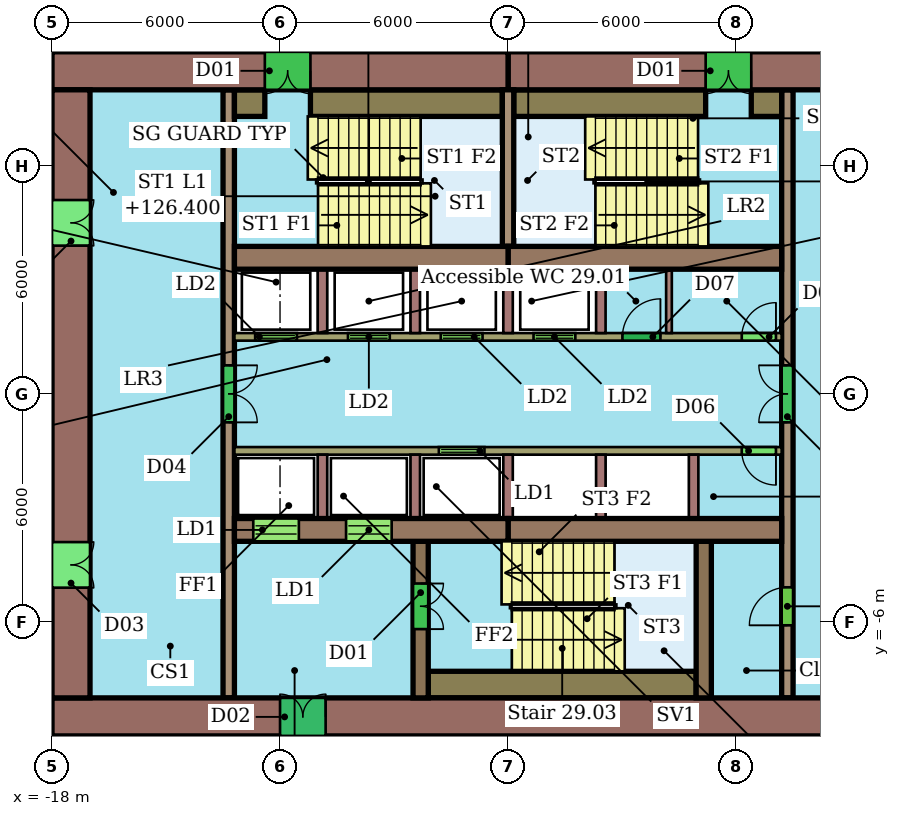
"""IFC4 building model, lengths in metres.
Left out: names, types, materials, properties, quantities, classifications, styles, units other than length and angle.
Written with IfcOpenShell. Run it as: python <this file> out.ifc"""

import sys

from ifc_helpers import new_model, si_unit, direction, frame, frame_2d, origin, place, context, subcontext, project, spatial, rectangle, extrude, element, fill, save


model = new_model("IFC4")
c1 = context("Model", 3, precision=1e-05, world=origin(), true_north=direction((0.0, 1.0)))
c2 = subcontext(c1, "Body", "Model", "MODEL_VIEW")
j1 = project(units=[si_unit("LENGTHUNIT", "METRE"), si_unit("PLANEANGLEUNIT", "RADIAN")], contexts=[c1])
p1 = place(None, origin())
s1 = spatial("IfcSite", under=j1, at=p1, CompositionType="ELEMENT")
p2 = place(p1, origin())
s2 = spatial("IfcBuilding", under=s1, at=p2, CompositionType="ELEMENT")
p3 = place(p2, frame((0.0, 0.0, 124.6)))
s3 = spatial("IfcBuildingStorey", under=s2, at=p3, CompositionType="ELEMENT", Elevation=124.6)
p4 = place(p3, frame((6.0, 8.5, 0.0), z_axis=(0.0, 0.0, 1.0), x_axis=(-1.0, 0.0, 0.0)))
e1 = element("IfcWall", 1, at=p4, inside=s3, PredefinedType="SHEAR", context=c2, shape_type="SweptSolid", body=[
    extrude(rectangle(XDim=12.0, YDim=1.0, at=frame_2d((6.0, 0.0))), origin(), (0.0, 0.0, 1.0), 3.3),
])
p5 = place(p4, frame((5.6, 0.0, 0.0)))
e2 = element("IfcOpeningElement", 2, at=p5, cuts=e1, PredefinedType="OPENING", context=c2, shape_type="SweptSolid", body=[
    extrude(rectangle(XDim=1.2, YDim=2.1, at=frame_2d((0.6, 1.05))), frame((0.0, 0.51, 0.0), z_axis=(0.0, -1.0, 0.0), x_axis=(1.0, 0.0, 0.0)), (0.0, 0.0, 1.0), 1.02),
])
p6 = place(p3, frame((-6.0, 8.5, 0.0), z_axis=(0.0, 0.0, 1.0), x_axis=(-1.0, 0.0, 0.0)))
e3 = element("IfcWall", 3, at=p6, inside=s3, PredefinedType="SHEAR", context=c2, shape_type="SweptSolid", body=[
    extrude(rectangle(XDim=12.0, YDim=1.0, at=frame_2d((6.0, 0.0))), origin(), (0.0, 0.0, 1.0), 3.3),
])
p7 = place(p6, frame((5.2, 0.0, 0.0)))
e4 = element("IfcOpeningElement", 4, at=p7, cuts=e3, PredefinedType="OPENING", context=c2, shape_type="SweptSolid", body=[
    extrude(rectangle(XDim=1.2, YDim=2.1, at=frame_2d((0.6, 1.05))), frame((0.0, 0.51, 0.0), z_axis=(0.0, -1.0, 0.0), x_axis=(1.0, 0.0, 0.0)), (0.0, 0.0, 1.0), 1.02),
])
p8 = place(p3, frame((-18.0, -8.5, 0.0), z_axis=(0.0, 0.0, 1.0), x_axis=(1.0, 0.0, 0.0)))
e5 = element("IfcWall", 5, at=p8, inside=s3, PredefinedType="SHEAR", context=c2, shape_type="SweptSolid", body=[
    extrude(rectangle(XDim=24.0, YDim=1.0, at=frame_2d((12.0, 0.0))), origin(), (0.0, 0.0, 1.0), 3.3),
])
p9 = place(p8, frame((6.0, 0.0, 0.0)))
e6 = element("IfcOpeningElement", 6, at=p9, cuts=e5, PredefinedType="OPENING", context=c2, shape_type="SweptSolid", body=[
    extrude(rectangle(XDim=1.2, YDim=2.1, at=frame_2d((0.6, 1.05))), frame((0.0, 0.51, 0.0), z_axis=(0.0, -1.0, 0.0), x_axis=(1.0, 0.0, 0.0)), (0.0, 0.0, 1.0), 1.02),
])
p10 = place(p3, frame((-17.5, 8.0, 0.0), z_axis=(0.0, 0.0, 1.0), x_axis=(0.0, -1.0, 0.0)))
e7 = element("IfcWall", 7, at=p10, inside=s3, PredefinedType="SHEAR", context=c2, shape_type="SweptSolid", body=[
    extrude(rectangle(XDim=16.0, YDim=1.0, at=frame_2d((8.0, 0.0))), origin(), (0.0, 0.0, 1.0), 3.3),
])
p11 = place(p10, frame((11.9, 0.0, 0.0)))
e8 = element("IfcOpeningElement", 8, at=p11, cuts=e7, PredefinedType="OPENING", context=c2, shape_type="SweptSolid", body=[
    extrude(rectangle(XDim=1.2, YDim=2.1, at=frame_2d((0.6, 1.05))), frame((0.0, 0.51, 0.0), z_axis=(0.0, -1.0, 0.0), x_axis=(1.0, 0.0, 0.0)), (0.0, 0.0, 1.0), 1.02),
])
p12 = place(p10, frame((2.9, 0.0, 0.0)))
e9 = element("IfcOpeningElement", 9, at=p12, cuts=e7, PredefinedType="OPENING", context=c2, shape_type="SweptSolid", body=[
    extrude(rectangle(XDim=1.2, YDim=2.1, at=frame_2d((0.6, 1.05))), frame((0.0, 0.51, 0.0), z_axis=(0.0, -1.0, 0.0), x_axis=(1.0, 0.0, 0.0)), (0.0, 0.0, 1.0), 1.02),
])
for number, where, z_axis, x_axis in (
    (10, (-13.2, 3.58, 0.0), (0.0, 0.0, 1.0), (1.0, 0.0, 0.0)),
    (11, (-6.0, 3.58, 0.0), (0.0, 0.0, 1.0), (1.0, 0.0, 0.0)),
):
    element("IfcWall", number, at=place(p3, frame(where, z_axis=z_axis, x_axis=x_axis)), inside=s3, PredefinedType="SHEAR", context=c2, shape_type="SweptSolid", body=[
        extrude(rectangle(XDim=7.2, YDim=0.6, at=frame_2d((3.6, 0.0))), origin(), (0.0, 0.0, 1.0), 3.3),
    ])
p13 = place(p3, frame((-13.2, -3.58, 0.0), z_axis=(0.0, 0.0, 1.0), x_axis=(1.0, 0.0, 0.0)))
e12 = element("IfcWall", 12, at=p13, inside=s3, PredefinedType="SHEAR", context=c2, shape_type="SweptSolid", body=[
    extrude(rectangle(XDim=7.2, YDim=0.6, at=frame_2d((3.6, 0.0))), origin(), (0.0, 0.0, 1.0), 3.3),
])
p14 = place(p13, frame((0.496, 0.0, 0.0)))
e13 = element("IfcOpeningElement", 13, at=p14, cuts=e12, PredefinedType="OPENING", context=c2, shape_type="SweptSolid", body=[
    extrude(rectangle(XDim=1.2, YDim=2.1, at=frame_2d((0.6, 1.05))), frame((0.0, 0.31, 0.0), z_axis=(0.0, -1.0, 0.0), x_axis=(1.0, 0.0, 0.0)), (0.0, 0.0, 1.0), 0.62),
])
p15 = place(p13, frame((2.938, 0.0, 0.0)))
e14 = element("IfcOpeningElement", 14, at=p15, cuts=e12, PredefinedType="OPENING", context=c2, shape_type="SweptSolid", body=[
    extrude(rectangle(XDim=1.2, YDim=2.1, at=frame_2d((0.6, 1.05))), frame((0.0, 0.31, 0.0), z_axis=(0.0, -1.0, 0.0), x_axis=(1.0, 0.0, 0.0)), (0.0, 0.0, 1.0), 0.62),
])
p16 = place(p3, frame((-6.0, -3.58, 0.0), z_axis=(0.0, 0.0, 1.0), x_axis=(1.0, 0.0, 0.0)))
e15 = element("IfcWall", 15, at=p16, inside=s3, PredefinedType="SHEAR", context=c2, shape_type="SweptSolid", body=[
    extrude(rectangle(XDim=7.2, YDim=0.6, at=frame_2d((3.6, 0.0))), origin(), (0.0, 0.0, 1.0), 3.3),
])
p17 = place(p3, frame((-13.35, 8.0, 0.0), z_axis=(0.0, 0.0, 1.0), x_axis=(0.0, -1.0, 0.0)))
e16 = element("IfcWall", 16, at=p17, inside=s3, PredefinedType="SHEAR", context=c2, shape_type="SweptSolid", body=[
    extrude(rectangle(XDim=16.0, YDim=0.3, at=frame_2d((8.0, 0.0))), origin(), (0.0, 0.0, 1.0), 3.3),
])
p18 = place(p17, frame((7.25, 0.0, 0.0)))
e17 = element("IfcOpeningElement", 17, at=p18, cuts=e16, PredefinedType="OPENING", context=c2, shape_type="SweptSolid", body=[
    extrude(rectangle(XDim=1.5, YDim=2.1, at=frame_2d((0.75, 1.05))), frame((0.0, 0.16, 0.0), z_axis=(0.0, -1.0, 0.0), x_axis=(1.0, 0.0, 0.0)), (0.0, 0.0, 1.0), 0.32),
])
p19 = place(p3, frame((1.35, -8.0, 0.0), z_axis=(0.0, 0.0, 1.0), x_axis=(0.0, 1.0, 0.0)))
e18 = element("IfcWall", 18, at=p19, inside=s3, PredefinedType="SHEAR", context=c2, shape_type="SweptSolid", body=[
    extrude(rectangle(XDim=16.0, YDim=0.3, at=frame_2d((8.0, 0.0))), origin(), (0.0, 0.0, 1.0), 3.3),
])
p20 = place(p19, frame((1.91, 0.0, 0.0)))
e19 = element("IfcOpeningElement", 19, at=p20, cuts=e18, PredefinedType="OPENING", context=c2, shape_type="SweptSolid", body=[
    extrude(rectangle(XDim=1.0, YDim=2.1, at=frame_2d((0.5, 1.05))), frame((0.0, 0.16, 0.0), z_axis=(0.0, -1.0, 0.0), x_axis=(1.0, 0.0, 0.0)), (0.0, 0.0, 1.0), 0.32),
])
p21 = place(p19, frame((7.25, 0.0, 0.0)))
e20 = element("IfcOpeningElement", 20, at=p21, cuts=e18, PredefinedType="OPENING", context=c2, shape_type="SweptSolid", body=[
    extrude(rectangle(XDim=1.5, YDim=2.1, at=frame_2d((0.75, 1.05))), frame((0.0, 0.16, 0.0), z_axis=(0.0, -1.0, 0.0), x_axis=(1.0, 0.0, 0.0)), (0.0, 0.0, 1.0), 0.32),
])
p22 = place(p3, frame((-13.2, 1.5, 0.0), z_axis=(0.0, 0.0, 1.0), x_axis=(1.0, 0.0, 0.0)))
e21 = element("IfcWall", 21, at=p22, inside=s3, PredefinedType="SHEAR", context=c2, shape_type="SweptSolid", body=[
    extrude(rectangle(XDim=14.4, YDim=0.2, at=frame_2d((7.2, 0.0))), origin(), (0.0, 0.0, 1.0), 3.3),
])
p23 = place(p22, frame((0.546, 0.0, 0.0)))
e22 = element("IfcOpeningElement", 22, at=p23, cuts=e21, PredefinedType="OPENING", context=c2, shape_type="SweptSolid", body=[
    extrude(rectangle(XDim=1.1, YDim=2.1, at=frame_2d((0.55, 1.05))), frame((0.0, 0.11, 0.0), z_axis=(0.0, -1.0, 0.0), x_axis=(1.0, 0.0, 0.0)), (0.0, 0.0, 1.0), 0.22),
])
p24 = place(p22, frame((2.988, 0.0, 0.0)))
e23 = element("IfcOpeningElement", 23, at=p24, cuts=e21, PredefinedType="OPENING", context=c2, shape_type="SweptSolid", body=[
    extrude(rectangle(XDim=1.1, YDim=2.1, at=frame_2d((0.55, 1.05))), frame((0.0, 0.11, 0.0), z_axis=(0.0, -1.0, 0.0), x_axis=(1.0, 0.0, 0.0)), (0.0, 0.0, 1.0), 0.22),
])
p25 = place(p22, frame((5.429, 0.0, 0.0)))
e24 = element("IfcOpeningElement", 24, at=p25, cuts=e21, PredefinedType="OPENING", context=c2, shape_type="SweptSolid", body=[
    extrude(rectangle(XDim=1.1, YDim=2.1, at=frame_2d((0.55, 1.05))), frame((0.0, 0.11, 0.0), z_axis=(0.0, -1.0, 0.0), x_axis=(1.0, 0.0, 0.0)), (0.0, 0.0, 1.0), 0.22),
])
p26 = place(p22, frame((7.871, 0.0, 0.0)))
e25 = element("IfcOpeningElement", 25, at=p26, cuts=e21, PredefinedType="OPENING", context=c2, shape_type="SweptSolid", body=[
    extrude(rectangle(XDim=1.1, YDim=2.1, at=frame_2d((0.55, 1.05))), frame((0.0, 0.11, 0.0), z_axis=(0.0, -1.0, 0.0), x_axis=(1.0, 0.0, 0.0)), (0.0, 0.0, 1.0), 0.22),
])
p27 = place(p22, frame((10.21, 0.0, 0.0)))
e26 = element("IfcOpeningElement", 26, at=p27, cuts=e21, PredefinedType="OPENING", context=c2, shape_type="SweptSolid", body=[
    extrude(rectangle(XDim=1.0, YDim=2.1, at=frame_2d((0.5, 1.05))), frame((0.0, 0.11, 0.0), z_axis=(0.0, -1.0, 0.0), x_axis=(1.0, 0.0, 0.0)), (0.0, 0.0, 1.0), 0.22),
])
p28 = place(p22, frame((13.35, 0.0, 0.0)))
e27 = element("IfcOpeningElement", 27, at=p28, cuts=e21, PredefinedType="OPENING", context=c2, shape_type="SweptSolid", body=[
    extrude(rectangle(XDim=0.9, YDim=2.1, at=frame_2d((0.45, 1.05))), frame((0.0, 0.11, 0.0), z_axis=(0.0, -1.0, 0.0), x_axis=(1.0, 0.0, 0.0)), (0.0, 0.0, 1.0), 0.22),
])
p29 = place(p3, frame((1.2, -1.5, 0.0), z_axis=(0.0, 0.0, 1.0), x_axis=(-1.0, 0.0, 0.0)))
e28 = element("IfcWall", 28, at=p29, inside=s3, PredefinedType="SHEAR", context=c2, shape_type="SweptSolid", body=[
    extrude(rectangle(XDim=14.4, YDim=0.2, at=frame_2d((7.2, 0.0))), origin(), (0.0, 0.0, 1.0), 3.3),
])
p30 = place(p29, frame((7.821, 0.0, 0.0)))
e29 = element("IfcOpeningElement", 29, at=p30, cuts=e28, PredefinedType="OPENING", context=c2, shape_type="SweptSolid", body=[
    extrude(rectangle(XDim=1.2, YDim=2.1, at=frame_2d((0.6, 1.05))), frame((0.0, 0.11, 0.0), z_axis=(0.0, -1.0, 0.0), x_axis=(1.0, 0.0, 0.0)), (0.0, 0.0, 1.0), 0.22),
])
p31 = place(p29, frame((0.15, 0.0, 0.0)))
e30 = element("IfcOpeningElement", 30, at=p31, cuts=e28, PredefinedType="OPENING", context=c2, shape_type="SweptSolid", body=[
    extrude(rectangle(XDim=0.9, YDim=2.1, at=frame_2d((0.45, 1.05))), frame((0.0, 0.11, 0.0), z_axis=(0.0, -1.0, 0.0), x_axis=(1.0, 0.0, 0.0)), (0.0, 0.0, 1.0), 0.22),
])
p32 = place(p3, frame((-8.3, -3.88, 0.0), z_axis=(0.0, 0.0, 1.0), x_axis=(0.0, -1.0, 0.0)))
e31 = element("IfcWall", 31, at=p32, inside=s3, PredefinedType="SHEAR", context=c2, shape_type="SweptSolid", body=[
    extrude(rectangle(XDim=4.12, YDim=0.4, at=frame_2d((2.06, 0.0))), origin(), (0.0, 0.0, 1.0), 3.3),
])
p33 = place(p32, frame((1.11, 0.0, 0.0)))
e32 = element("IfcOpeningElement", 32, at=p33, cuts=e31, PredefinedType="OPENING", context=c2, shape_type="SweptSolid", body=[
    extrude(rectangle(XDim=1.2, YDim=2.1, at=frame_2d((0.6, 1.05))), frame((0.0, 0.21, 0.0), z_axis=(0.0, -1.0, 0.0), x_axis=(1.0, 0.0, 0.0)), (0.0, 0.0, 1.0), 0.42),
])
p34 = place(p3, frame((-0.85, -3.88, 0.0), z_axis=(0.0, 0.0, 1.0), x_axis=(0.0, -1.0, 0.0)))
e33 = element("IfcWall", 33, at=p34, inside=s3, PredefinedType="SHEAR", context=c2, shape_type="SweptSolid", body=[
    extrude(rectangle(XDim=4.12, YDim=0.4, at=frame_2d((2.06, 0.0))), origin(), (0.0, 0.0, 1.0), 3.3),
])
p35 = place(p3, frame((-6.0, 3.88, 0.0), z_axis=(0.0, 0.0, 1.0), x_axis=(0.0, 1.0, 0.0)))
e34 = element("IfcWall", 34, at=p35, inside=s3, PredefinedType="SHEAR", context=c2, shape_type="SweptSolid", body=[
    extrude(rectangle(XDim=4.12, YDim=0.3, at=frame_2d((2.06, 0.0))), origin(), (0.0, 0.0, 1.0), 3.3),
])
p36 = place(p3, frame((-13.2, 7.65, 0.0), z_axis=(0.0, 0.0, 1.0), x_axis=(1.0, 0.0, 0.0)))
e35 = element("IfcWall", 35, at=p36, inside=s3, PredefinedType="SHEAR", context=c2, shape_type="SweptSolid", body=[
    extrude(rectangle(XDim=0.8, YDim=0.7, at=frame_2d((0.4, 0.0))), origin(), (0.0, 0.0, 1.0), 3.3),
])
for number, where, z_axis, x_axis in (
    (36, (-11.2, 7.65, 0.0), (0.0, 0.0, 1.0), (1.0, 0.0, 0.0)),
    (37, (-5.85, 7.65, 0.0), (0.0, 0.0, 1.0), (1.0, 0.0, 0.0)),
):
    element("IfcWall", number, at=place(p3, frame(where, z_axis=z_axis, x_axis=x_axis)), inside=s3, PredefinedType="SHEAR", context=c2, shape_type="SweptSolid", body=[
        extrude(rectangle(XDim=5.05, YDim=0.7, at=frame_2d((2.525, 0.0))), origin(), (0.0, 0.0, 1.0), 3.3),
    ])
p37 = place(p3, frame((0.4, 7.65, 0.0), z_axis=(0.0, 0.0, 1.0), x_axis=(1.0, 0.0, 0.0)))
e38 = element("IfcWall", 38, at=p37, inside=s3, PredefinedType="SHEAR", context=c2, shape_type="SweptSolid", body=[
    extrude(rectangle(XDim=0.8, YDim=0.7, at=frame_2d((0.4, 0.0))), origin(), (0.0, 0.0, 1.0), 3.3),
])
p38 = place(p3, frame((-8.1, -7.65, 0.0), z_axis=(0.0, 0.0, 1.0), x_axis=(1.0, 0.0, 0.0)))
e39 = element("IfcWall", 39, at=p38, inside=s3, PredefinedType="SHEAR", context=c2, shape_type="SweptSolid", body=[
    extrude(rectangle(XDim=7.05, YDim=0.7, at=frame_2d((3.525, 0.0))), origin(), (0.0, 0.0, 1.0), 3.3),
])
for number, where, z_axis, x_axis in (
    (40, (-10.883, 1.6, 0.0), (0.0, 0.0, 1.0), (0.0, 1.0, 0.0)),
    (41, (-8.442, 1.6, 0.0), (0.0, 0.0, 1.0), (0.0, 1.0, 0.0)),
    (42, (-6.0, 1.6, 0.0), (0.0, 0.0, 1.0), (0.0, 1.0, 0.0)),
    (43, (-3.558, 1.6, 0.0), (0.0, 0.0, 1.0), (0.0, 1.0, 0.0)),
):
    element("IfcWall", number, at=place(p3, frame(where, z_axis=z_axis, x_axis=x_axis)), inside=s3, PredefinedType="SHEAR", context=c2, shape_type="SweptSolid", body=[
        extrude(rectangle(XDim=1.68, YDim=0.25, at=frame_2d((0.84, 0.0))), origin(), (0.0, 0.0, 1.0), 3.3),
    ])
p39 = place(p3, frame((-1.765, 1.6, 0.0), z_axis=(0.0, 0.0, 1.0), x_axis=(0.0, 1.0, 0.0)))
e44 = element("IfcWall", 44, at=p39, inside=s3, PredefinedType="PARTITIONING", context=c2, shape_type="SweptSolid", body=[
    extrude(rectangle(XDim=1.68, YDim=0.15, at=frame_2d((0.84, 0.0))), origin(), (0.0, 0.0, 1.0), 3.3),
])
for number, where, z_axis, x_axis in (
    (45, (-10.883, -1.6, 0.0), (0.0, 0.0, 1.0), (0.0, -1.0, 0.0)),
    (46, (-8.442, -1.6, 0.0), (0.0, 0.0, 1.0), (0.0, -1.0, 0.0)),
    (47, (-6.0, -1.6, 0.0), (0.0, 0.0, 1.0), (0.0, -1.0, 0.0)),
    (48, (-3.558, -1.6, 0.0), (0.0, 0.0, 1.0), (0.0, -1.0, 0.0)),
    (49, (-1.117, -1.6, 0.0), (0.0, 0.0, 1.0), (0.0, -1.0, 0.0)),
):
    element("IfcWall", number, at=place(p3, frame(where, z_axis=z_axis, x_axis=x_axis)), inside=s3, PredefinedType="SHEAR", context=c2, shape_type="SweptSolid", body=[
        extrude(rectangle(XDim=1.68, YDim=0.25, at=frame_2d((0.84, 0.0))), origin(), (0.0, 0.0, 1.0), 3.3),
    ])
p40 = place(p5, origin())
e50 = element("IfcDoor", 50, at=p40, inside=s3, OperationType="DOUBLE_DOOR_SINGLE_SWING", PredefinedType="NOTDEFINED", context=c2, shape_type="SweptSolid", body=[
    extrude(rectangle(XDim=1.2, YDim=2.1, at=frame_2d((0.6, 1.05))), frame((0.0, 0.025, 0.0), z_axis=(0.0, -1.0, 0.0), x_axis=(1.0, 0.0, 0.0)), (0.0, 0.0, 1.0), 0.05),
])
fill(e2, e50)
p41 = place(p7, origin())
e51 = element("IfcDoor", 51, at=p41, inside=s3, OperationType="DOUBLE_DOOR_SINGLE_SWING", PredefinedType="NOTDEFINED", context=c2, shape_type="SweptSolid", body=[
    extrude(rectangle(XDim=1.2, YDim=2.1, at=frame_2d((0.6, 1.05))), frame((0.0, 0.025, 0.0), z_axis=(0.0, -1.0, 0.0), x_axis=(1.0, 0.0, 0.0)), (0.0, 0.0, 1.0), 0.05),
])
fill(e4, e51)
p42 = place(p9, origin())
e52 = element("IfcDoor", 52, at=p42, inside=s3, OperationType="DOUBLE_DOOR_SINGLE_SWING", PredefinedType="NOTDEFINED", context=c2, shape_type="SweptSolid", body=[
    extrude(rectangle(XDim=1.2, YDim=2.1, at=frame_2d((0.6, 1.05))), frame((0.0, 0.025, 0.0), z_axis=(0.0, -1.0, 0.0), x_axis=(1.0, 0.0, 0.0)), (0.0, 0.0, 1.0), 0.05),
])
fill(e6, e52)
p43 = place(p11, origin())
e53 = element("IfcDoor", 53, at=p43, inside=s3, OperationType="DOUBLE_DOOR_SINGLE_SWING", PredefinedType="NOTDEFINED", context=c2, shape_type="SweptSolid", body=[
    extrude(rectangle(XDim=1.2, YDim=2.1, at=frame_2d((0.6, 1.05))), frame((0.0, 0.025, 0.0), z_axis=(0.0, -1.0, 0.0), x_axis=(1.0, 0.0, 0.0)), (0.0, 0.0, 1.0), 0.05),
])
fill(e8, e53)
p44 = place(p12, origin())
e54 = element("IfcDoor", 54, at=p44, inside=s3, OperationType="DOUBLE_DOOR_SINGLE_SWING", PredefinedType="NOTDEFINED", context=c2, shape_type="SweptSolid", body=[
    extrude(rectangle(XDim=1.2, YDim=2.1, at=frame_2d((0.6, 1.05))), frame((0.0, 0.025, 0.0), z_axis=(0.0, -1.0, 0.0), x_axis=(1.0, 0.0, 0.0)), (0.0, 0.0, 1.0), 0.05),
])
fill(e9, e54)
p45 = place(p14, origin())
e55 = element("IfcDoor", 55, at=p45, inside=s3, OperationType="DOUBLE_DOOR_SLIDING", PredefinedType="NOTDEFINED", context=c2, shape_type="SweptSolid", body=[
    extrude(rectangle(XDim=1.2, YDim=2.1, at=frame_2d((0.6, 1.05))), frame((0.0, 0.025, 0.0), z_axis=(0.0, -1.0, 0.0), x_axis=(1.0, 0.0, 0.0)), (0.0, 0.0, 1.0), 0.05),
])
fill(e13, e55)
p46 = place(p15, origin())
e56 = element("IfcDoor", 56, at=p46, inside=s3, OperationType="DOUBLE_DOOR_SLIDING", PredefinedType="NOTDEFINED", context=c2, shape_type="SweptSolid", body=[
    extrude(rectangle(XDim=1.2, YDim=2.1, at=frame_2d((0.6, 1.05))), frame((0.0, 0.025, 0.0), z_axis=(0.0, -1.0, 0.0), x_axis=(1.0, 0.0, 0.0)), (0.0, 0.0, 1.0), 0.05),
])
fill(e14, e56)
p47 = place(p18, origin())
e57 = element("IfcDoor", 57, at=p47, inside=s3, OperationType="DOUBLE_DOOR_SINGLE_SWING", PredefinedType="NOTDEFINED", context=c2, shape_type="SweptSolid", body=[
    extrude(rectangle(XDim=1.5, YDim=2.1, at=frame_2d((0.75, 1.05))), frame((0.0, 0.025, 0.0), z_axis=(0.0, -1.0, 0.0), x_axis=(1.0, 0.0, 0.0)), (0.0, 0.0, 1.0), 0.05),
])
fill(e17, e57)
p48 = place(p20, origin())
e58 = element("IfcDoor", 58, at=p48, inside=s3, OperationType="SINGLE_SWING_LEFT", PredefinedType="NOTDEFINED", context=c2, shape_type="SweptSolid", body=[
    extrude(rectangle(XDim=1.0, YDim=2.1, at=frame_2d((0.5, 1.05))), frame((0.0, 0.025, 0.0), z_axis=(0.0, -1.0, 0.0), x_axis=(1.0, 0.0, 0.0)), (0.0, 0.0, 1.0), 0.05),
])
fill(e19, e58)
p49 = place(p21, origin())
e59 = element("IfcDoor", 59, at=p49, inside=s3, OperationType="DOUBLE_DOOR_SINGLE_SWING", PredefinedType="NOTDEFINED", context=c2, shape_type="SweptSolid", body=[
    extrude(rectangle(XDim=1.5, YDim=2.1, at=frame_2d((0.75, 1.05))), frame((0.0, 0.025, 0.0), z_axis=(0.0, -1.0, 0.0), x_axis=(1.0, 0.0, 0.0)), (0.0, 0.0, 1.0), 0.05),
])
fill(e20, e59)
p50 = place(p23, origin())
e60 = element("IfcDoor", 60, at=p50, inside=s3, OperationType="DOUBLE_DOOR_SLIDING", PredefinedType="NOTDEFINED", context=c2, shape_type="SweptSolid", body=[
    extrude(rectangle(XDim=1.1, YDim=2.1, at=frame_2d((0.55, 1.05))), frame((0.0, 0.025, 0.0), z_axis=(0.0, -1.0, 0.0), x_axis=(1.0, 0.0, 0.0)), (0.0, 0.0, 1.0), 0.05),
])
fill(e22, e60)
p51 = place(p24, origin())
e61 = element("IfcDoor", 61, at=p51, inside=s3, OperationType="DOUBLE_DOOR_SLIDING", PredefinedType="NOTDEFINED", context=c2, shape_type="SweptSolid", body=[
    extrude(rectangle(XDim=1.1, YDim=2.1, at=frame_2d((0.55, 1.05))), frame((0.0, 0.025, 0.0), z_axis=(0.0, -1.0, 0.0), x_axis=(1.0, 0.0, 0.0)), (0.0, 0.0, 1.0), 0.05),
])
fill(e23, e61)
p52 = place(p25, origin())
e62 = element("IfcDoor", 62, at=p52, inside=s3, OperationType="DOUBLE_DOOR_SLIDING", PredefinedType="NOTDEFINED", context=c2, shape_type="SweptSolid", body=[
    extrude(rectangle(XDim=1.1, YDim=2.1, at=frame_2d((0.55, 1.05))), frame((0.0, 0.025, 0.0), z_axis=(0.0, -1.0, 0.0), x_axis=(1.0, 0.0, 0.0)), (0.0, 0.0, 1.0), 0.05),
])
fill(e24, e62)
p53 = place(p26, origin())
e63 = element("IfcDoor", 63, at=p53, inside=s3, OperationType="DOUBLE_DOOR_SLIDING", PredefinedType="NOTDEFINED", context=c2, shape_type="SweptSolid", body=[
    extrude(rectangle(XDim=1.1, YDim=2.1, at=frame_2d((0.55, 1.05))), frame((0.0, 0.025, 0.0), z_axis=(0.0, -1.0, 0.0), x_axis=(1.0, 0.0, 0.0)), (0.0, 0.0, 1.0), 0.05),
])
fill(e25, e63)
p54 = place(p27, origin())
e64 = element("IfcDoor", 64, at=p54, inside=s3, OperationType="SINGLE_SWING_RIGHT", PredefinedType="NOTDEFINED", context=c2, shape_type="SweptSolid", body=[
    extrude(rectangle(XDim=1.0, YDim=2.1, at=frame_2d((0.5, 1.05))), frame((0.0, 0.025, 0.0), z_axis=(0.0, -1.0, 0.0), x_axis=(1.0, 0.0, 0.0)), (0.0, 0.0, 1.0), 0.05),
])
fill(e26, e64)
p55 = place(p28, origin())
e65 = element("IfcDoor", 65, at=p55, inside=s3, OperationType="SINGLE_SWING_RIGHT", PredefinedType="NOTDEFINED", context=c2, shape_type="SweptSolid", body=[
    extrude(rectangle(XDim=0.9, YDim=2.1, at=frame_2d((0.45, 1.05))), frame((0.0, 0.025, 0.0), z_axis=(0.0, -1.0, 0.0), x_axis=(1.0, 0.0, 0.0)), (0.0, 0.0, 1.0), 0.05),
])
fill(e27, e65)
p56 = place(p30, origin())
e66 = element("IfcDoor", 66, at=p56, inside=s3, OperationType="DOUBLE_DOOR_SLIDING", PredefinedType="NOTDEFINED", context=c2, shape_type="SweptSolid", body=[
    extrude(rectangle(XDim=1.2, YDim=2.1, at=frame_2d((0.6, 1.05))), frame((0.0, 0.025, 0.0), z_axis=(0.0, -1.0, 0.0), x_axis=(1.0, 0.0, 0.0)), (0.0, 0.0, 1.0), 0.05),
])
fill(e29, e66)
p57 = place(p31, origin())
e67 = element("IfcDoor", 67, at=p57, inside=s3, OperationType="SINGLE_SWING_LEFT", PredefinedType="NOTDEFINED", context=c2, shape_type="SweptSolid", body=[
    extrude(rectangle(XDim=0.9, YDim=2.1, at=frame_2d((0.45, 1.05))), frame((0.0, 0.025, 0.0), z_axis=(0.0, -1.0, 0.0), x_axis=(1.0, 0.0, 0.0)), (0.0, 0.0, 1.0), 0.05),
])
fill(e30, e67)
p58 = place(p33, origin())
e68 = element("IfcDoor", 68, at=p58, inside=s3, OperationType="DOUBLE_DOOR_SINGLE_SWING", PredefinedType="NOTDEFINED", context=c2, shape_type="SweptSolid", body=[
    extrude(rectangle(XDim=1.2, YDim=2.1, at=frame_2d((0.6, 1.05))), frame((0.0, 0.025, 0.0), z_axis=(0.0, -1.0, 0.0), x_axis=(1.0, 0.0, 0.0)), (0.0, 0.0, 1.0), 0.05),
])
fill(e32, e68)
save(model, sys.argv[1])
